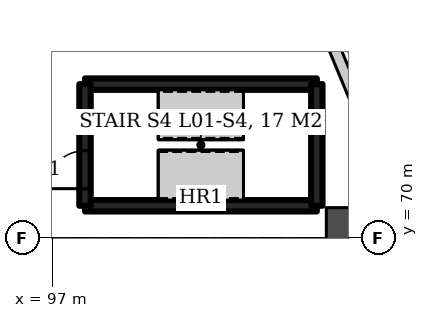
"""IFC4 building model, lengths in metres.
Left out: names, types, materials, properties, quantities, classifications, styles, units other than length and angle.
Written with IfcOpenShell. Run it as: python <this file> out.ifc"""

import sys

from ifc_helpers import new_model, si_unit, direction, frame, frame_2d, origin, origin_2d, place, context, subcontext, project, spatial, rectangle, extrude, element, fill, save


model = new_model("IFC4")
c1 = context("Model", 3, precision=1e-05, world=origin(), true_north=direction((0.0, 1.0)))
c2 = subcontext(c1, "Body", "Model", "MODEL_VIEW")
j1 = project(units=[si_unit("LENGTHUNIT", "METRE"), si_unit("PLANEANGLEUNIT", "RADIAN")], contexts=[c1])
p1 = place(None, origin())
s1 = spatial("IfcSite", under=j1, at=p1, CompositionType="ELEMENT")
p2 = place(p1, origin())
s2 = spatial("IfcBuilding", under=s1, at=p2, CompositionType="ELEMENT")
p3 = place(p2, frame((0.0, 0.0, 6.0)))
s3 = spatial("IfcBuildingStorey", under=s2, at=p3, CompositionType="ELEMENT", Elevation=6.0)
p4 = place(p3, frame((105.0, 70.0, 0.0), z_axis=(0.0, 0.0, 1.0), x_axis=(1.0, 0.0, 0.0)))
e1 = element("IfcColumn", 1, at=p4, inside=s3, PredefinedType="COLUMN", context=c2, shape_type="SweptSolid", body=[
    extrude(rectangle(XDim=1.6, YDim=1.6, at=origin_2d()), origin(), (0.0, 0.0, 1.0), 9.0),
])
p5 = place(p3, frame((105.335, 72.769, 0.0), z_axis=(0.0, 0.0, 1.0), x_axis=(-0.382709424419, 0.923868765822, 0.0)))
e2 = element("IfcWall", 2, at=p5, inside=s3, PredefinedType="SOLIDWALL", context=c2, shape_type="SweptSolid", body=[
    extrude(rectangle(XDim=2.793, YDim=0.3, at=frame_2d((1.397, 0.0))), origin(), (0.0, 0.0, 1.0), 8.7),
])
for number, where, z_axis, x_axis in (
    (3, (97.85, 70.85, 0.0), (0.0, 0.0, 1.0), (1.0, 0.0, 0.0)),
    (4, (97.85, 74.05, 0.0), (0.0, 0.0, 1.0), (1.0, 0.0, 0.0)),
):
    element("IfcWall", number, at=place(p3, frame(where, z_axis=z_axis, x_axis=x_axis)), inside=s3, PredefinedType="SHEAR", context=c2, shape_type="SweptSolid", body=[
        extrude(rectangle(XDim=6.1, YDim=0.3, at=frame_2d((3.05, 0.0))), origin(), (0.0, 0.0, 1.0), 9.0),
    ])
p6 = place(p3, frame((97.85, 70.85, 0.0), z_axis=(0.0, 0.0, 1.0), x_axis=(0.0, 1.0, 0.0)))
e5 = element("IfcWall", 5, at=p6, inside=s3, PredefinedType="SHEAR", context=c2, shape_type="SweptSolid", body=[
    extrude(rectangle(XDim=3.2, YDim=0.3, at=frame_2d((1.6, 0.0))), origin(), (0.0, 0.0, 1.0), 9.0),
])
p7 = place(p6, frame((0.45, 0.0, 0.0)))
e6 = element("IfcOpeningElement", 6, at=p7, cuts=e5, PredefinedType="OPENING", context=c2, shape_type="SweptSolid", body=[
    extrude(rectangle(XDim=1.0, YDim=2.1, at=frame_2d((0.5, 1.05))), frame((0.0, 0.16, 0.0), z_axis=(0.0, -1.0, 0.0), x_axis=(1.0, 0.0, 0.0)), (0.0, 0.0, 1.0), 0.32),
])
p8 = place(p3, frame((103.95, 70.85, 0.0), z_axis=(0.0, 0.0, 1.0), x_axis=(0.0, 1.0, 0.0)))
e7 = element("IfcWall", 7, at=p8, inside=s3, PredefinedType="SHEAR", context=c2, shape_type="SweptSolid", body=[
    extrude(rectangle(XDim=3.2, YDim=0.3, at=frame_2d((1.6, 0.0))), origin(), (0.0, 0.0, 1.0), 9.0),
])
p9 = place(p7, origin())
e8 = element("IfcDoor", 8, at=p9, inside=s3, OperationType="SINGLE_SWING_LEFT", PredefinedType="DOOR", context=c2, shape_type="SweptSolid", body=[
    extrude(rectangle(XDim=1.0, YDim=2.1, at=frame_2d((0.5, 1.05))), frame((0.0, 0.025, 0.0), z_axis=(0.0, -1.0, 0.0), x_axis=(1.0, 0.0, 0.0)), (0.0, 0.0, 1.0), 0.05),
])
fill(e6, e8)
save(model, sys.argv[1])
